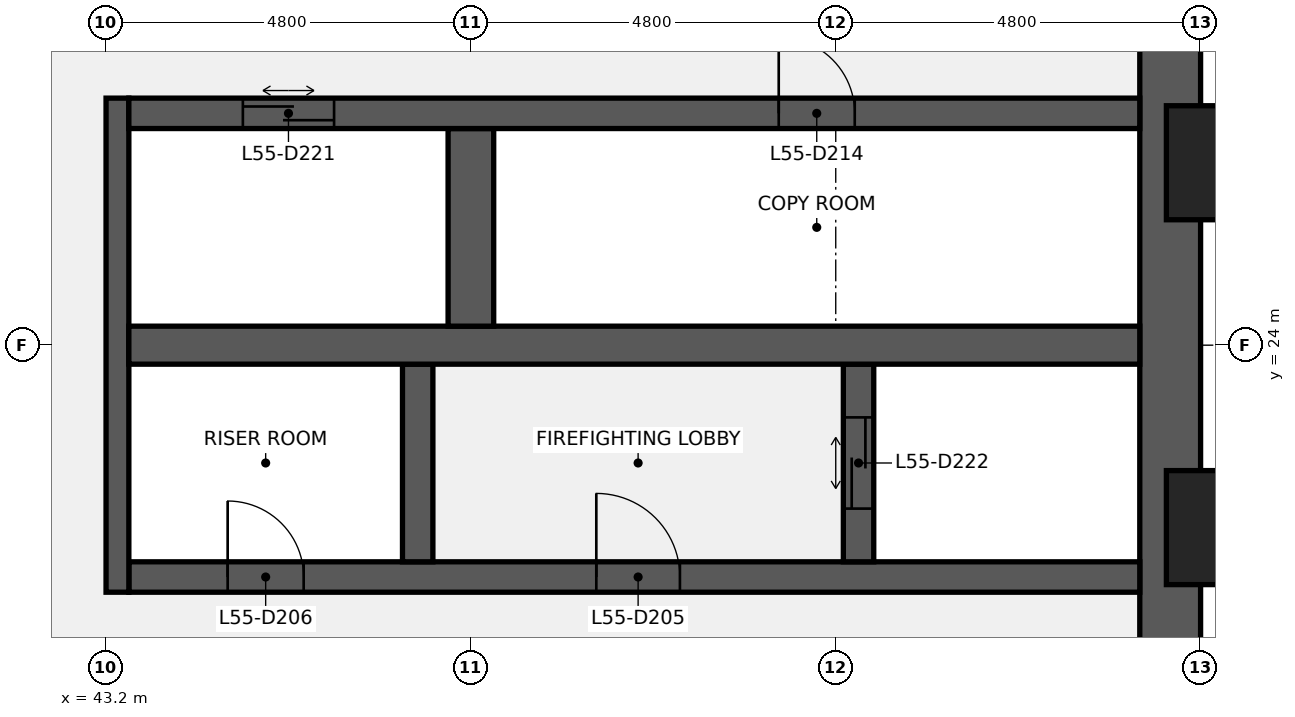
"""IFC4 building model, lengths in metres.
Left out: names, types, materials, properties, quantities, classifications, styles, units other than length and angle.
Written with IfcOpenShell. Run it as: python <this file> out.ifc"""

import sys

from ifc_helpers import new_model, si_unit, direction, frame, frame_2d, origin, origin_2d, place, context, subcontext, project, spatial, rectangle, extrude, element, fill, save


model = new_model("IFC4")
c1 = context("Model", 3, precision=1e-05, world=origin(), true_north=direction((0.0, 1.0)))
c2 = subcontext(c1, "Body", "Model", "MODEL_VIEW")
j1 = project(units=[si_unit("LENGTHUNIT", "METRE"), si_unit("PLANEANGLEUNIT", "RADIAN")], contexts=[c1])
p1 = place(None, origin())
s1 = spatial("IfcSite", under=j1, at=p1, CompositionType="ELEMENT")
p2 = place(p1, origin())
s2 = spatial("IfcBuilding", under=s1, at=p2, CompositionType="ELEMENT")
p3 = place(p2, frame((0.0, 0.0, 249.2)))
s3 = spatial("IfcBuildingStorey", under=s2, at=p3, CompositionType="ELEMENT", Elevation=249.2)
p4 = place(p3, frame((57.2, 38.4, 0.0), z_axis=(0.0, 0.0, 1.0), x_axis=(0.0, -1.0, 0.0)))
e1 = element("IfcWall", 1, at=p4, inside=s3, PredefinedType="SHEAR", context=c2, shape_type="SweptSolid", body=[
    extrude(rectangle(XDim=28.8, YDim=0.8, at=frame_2d((14.4, 0.0))), origin(), (0.0, 0.0, 1.0), 3.84),
])
p5 = place(p4, frame((18.45, 0.0, 0.9)))
e2 = element("IfcOpeningElement", 2, at=p5, cuts=e1, PredefinedType="OPENING", context=c2, shape_type="SweptSolid", body=[
    extrude(rectangle(XDim=1.5, YDim=1.5, at=frame_2d((0.75, 0.75))), frame((0.0, 0.41, 0.0), z_axis=(0.0, -1.0, 0.0), x_axis=(1.0, 0.0, 0.0)), (0.0, 0.0, 1.0), 0.82),
])
p6 = place(p4, frame((8.85, 0.0, 0.9)))
e3 = element("IfcOpeningElement", 3, at=p6, cuts=e1, PredefinedType="OPENING", context=c2, shape_type="SweptSolid", body=[
    extrude(rectangle(XDim=1.5, YDim=1.5, at=frame_2d((0.75, 0.75))), frame((0.0, 0.41, 0.0), z_axis=(0.0, -1.0, 0.0), x_axis=(1.0, 0.0, 0.0)), (0.0, 0.0, 1.0), 0.82),
])
p7 = place(p3, frame((43.5, 20.95, 0.0), z_axis=(0.0, 0.0, 1.0), x_axis=(1.0, 0.0, 0.0)))
e4 = element("IfcWall", 4, at=p7, inside=s3, PredefinedType="SHEAR", context=c2, shape_type="SweptSolid", body=[
    extrude(rectangle(XDim=13.3, YDim=0.4, at=frame_2d((6.65, 0.0))), origin(), (0.0, 0.0, 1.0), 3.84),
])
p8 = place(p7, frame((6.15, 0.0, 0.0)))
e5 = element("IfcOpeningElement", 5, at=p8, cuts=e4, PredefinedType="OPENING", context=c2, shape_type="SweptSolid", body=[
    extrude(rectangle(XDim=1.1, YDim=2.1, at=frame_2d((0.55, 1.05))), frame((0.0, 0.21, 0.0), z_axis=(0.0, -1.0, 0.0), x_axis=(1.0, 0.0, 0.0)), (0.0, 0.0, 1.0), 0.42),
])
p9 = place(p7, frame((1.3, 0.0, 0.0)))
e6 = element("IfcOpeningElement", 6, at=p9, cuts=e4, PredefinedType="OPENING", context=c2, shape_type="SweptSolid", body=[
    extrude(rectangle(XDim=1.0, YDim=2.1, at=frame_2d((0.5, 1.05))), frame((0.0, 0.21, 0.0), z_axis=(0.0, -1.0, 0.0), x_axis=(1.0, 0.0, 0.0)), (0.0, 0.0, 1.0), 0.42),
])
p10 = place(p3, frame((43.35, 20.75, 0.0), z_axis=(0.0, 0.0, 1.0), x_axis=(0.0, 1.0, 0.0)))
e7 = element("IfcWall", 7, at=p10, inside=s3, PredefinedType="SHEAR", context=c2, shape_type="SweptSolid", body=[
    extrude(rectangle(XDim=6.5, YDim=0.3, at=frame_2d((3.25, 0.0))), origin(), (0.0, 0.0, 1.0), 3.84),
])
p11 = place(p3, frame((53.1, 21.15, 0.0), z_axis=(0.0, 0.0, 1.0), x_axis=(0.0, 1.0, 0.0)))
e8 = element("IfcWall", 8, at=p11, inside=s3, PredefinedType="SHEAR", context=c2, shape_type="SweptSolid", body=[
    extrude(rectangle(XDim=2.6, YDim=0.4, at=frame_2d((1.3, 0.0))), origin(), (0.0, 0.0, 1.0), 3.84),
])
p12 = place(p11, frame((0.7, 0.0, 0.0)))
e9 = element("IfcOpeningElement", 9, at=p12, cuts=e8, PredefinedType="OPENING", context=c2, shape_type="SweptSolid", body=[
    extrude(rectangle(XDim=1.2, YDim=2.1, at=frame_2d((0.6, 1.05))), frame((0.0, 0.21, 0.0), z_axis=(0.0, -1.0, 0.0), x_axis=(1.0, 0.0, 0.0)), (0.0, 0.0, 1.0), 0.42),
])
p13 = place(p3, frame((47.3, 21.15, 0.0), z_axis=(0.0, 0.0, 1.0), x_axis=(0.0, 1.0, 0.0)))
e10 = element("IfcWall", 10, at=p13, inside=s3, PredefinedType="SHEAR", context=c2, shape_type="SweptSolid", body=[
    extrude(rectangle(XDim=2.6, YDim=0.4, at=frame_2d((1.3, 0.0))), origin(), (0.0, 0.0, 1.0), 3.84),
])
p14 = place(p3, frame((43.5, 24.0, 0.0), z_axis=(0.0, 0.0, 1.0), x_axis=(1.0, 0.0, 0.0)))
e11 = element("IfcWall", 11, at=p14, inside=s3, PredefinedType="SHEAR", context=c2, shape_type="SweptSolid", body=[
    extrude(rectangle(XDim=13.3, YDim=0.5, at=frame_2d((6.65, 0.0))), origin(), (0.0, 0.0, 1.0), 3.84),
])
p15 = place(p3, frame((48.0, 24.25, 0.0), z_axis=(0.0, 0.0, 1.0), x_axis=(0.0, 1.0, 0.0)))
e12 = element("IfcWall", 12, at=p15, inside=s3, PredefinedType="SHEAR", context=c2, shape_type="SweptSolid", body=[
    extrude(rectangle(XDim=2.6, YDim=0.6, at=frame_2d((1.3, 0.0))), origin(), (0.0, 0.0, 1.0), 3.84),
])
p16 = place(p3, frame((43.5, 27.05, 0.0), z_axis=(0.0, 0.0, 1.0), x_axis=(1.0, 0.0, 0.0)))
e13 = element("IfcWall", 13, at=p16, inside=s3, PredefinedType="SHEAR", context=c2, shape_type="SweptSolid", body=[
    extrude(rectangle(XDim=13.3, YDim=0.4, at=frame_2d((6.65, 0.0))), origin(), (0.0, 0.0, 1.0), 3.84),
])
p17 = place(p16, frame((8.55, 0.0, 0.0)))
e14 = element("IfcOpeningElement", 14, at=p17, cuts=e13, PredefinedType="OPENING", context=c2, shape_type="SweptSolid", body=[
    extrude(rectangle(XDim=1.0, YDim=2.1, at=frame_2d((0.5, 1.05))), frame((0.0, 0.21, 0.0), z_axis=(0.0, -1.0, 0.0), x_axis=(1.0, 0.0, 0.0)), (0.0, 0.0, 1.0), 0.42),
])
p18 = place(p16, frame((1.5, 0.0, 0.0)))
e15 = element("IfcOpeningElement", 15, at=p18, cuts=e13, PredefinedType="OPENING", context=c2, shape_type="SweptSolid", body=[
    extrude(rectangle(XDim=1.2, YDim=2.1, at=frame_2d((0.6, 1.05))), frame((0.0, 0.21, 0.0), z_axis=(0.0, -1.0, 0.0), x_axis=(1.0, 0.0, 0.0)), (0.0, 0.0, 1.0), 0.42),
])
for number, where, z_axis, x_axis in (
    (16, (58.35, 21.6, 0.0), (0.0, 0.0, 1.0), (0.0, 1.0, 0.0)),
    (17, (58.35, 26.4, 0.0), (0.0, 0.0, 1.0), (0.0, 1.0, 0.0)),
):
    element("IfcColumn", number, at=place(p3, frame(where, z_axis=z_axis, x_axis=x_axis)), inside=s3, PredefinedType="PILASTER", context=c2, shape_type="SweptSolid", body=[
        extrude(rectangle(XDim=2.4, YDim=1.5, at=origin_2d()), origin(), (0.0, 0.0, 1.0), 4.0),
    ])
p19 = place(p8, origin())
e18 = element("IfcDoor", 18, at=p19, inside=s3, OperationType="SINGLE_SWING_LEFT", PredefinedType="DOOR", context=c2, shape_type="SweptSolid", body=[
    extrude(rectangle(XDim=1.1, YDim=2.1, at=frame_2d((0.55, 1.05))), frame((0.0, 0.025, 0.0), z_axis=(0.0, -1.0, 0.0), x_axis=(1.0, 0.0, 0.0)), (0.0, 0.0, 1.0), 0.05),
])
fill(e5, e18)
p20 = place(p9, origin())
e19 = element("IfcDoor", 19, at=p20, inside=s3, OperationType="SINGLE_SWING_LEFT", PredefinedType="DOOR", context=c2, shape_type="SweptSolid", body=[
    extrude(rectangle(XDim=1.0, YDim=2.1, at=frame_2d((0.5, 1.05))), frame((0.0, 0.025, 0.0), z_axis=(0.0, -1.0, 0.0), x_axis=(1.0, 0.0, 0.0)), (0.0, 0.0, 1.0), 0.05),
])
fill(e6, e19)
p21 = place(p17, origin())
e20 = element("IfcDoor", 20, at=p21, inside=s3, OperationType="SINGLE_SWING_LEFT", PredefinedType="DOOR", context=c2, shape_type="SweptSolid", body=[
    extrude(rectangle(XDim=1.0, YDim=2.1, at=frame_2d((0.5, 1.05))), frame((0.0, 0.025, 0.0), z_axis=(0.0, -1.0, 0.0), x_axis=(1.0, 0.0, 0.0)), (0.0, 0.0, 1.0), 0.05),
])
fill(e14, e20)
p22 = place(p18, origin())
e21 = element("IfcDoor", 21, at=p22, inside=s3, OperationType="DOUBLE_DOOR_SLIDING", PredefinedType="DOOR", context=c2, shape_type="SweptSolid", body=[
    extrude(rectangle(XDim=1.2, YDim=2.1, at=frame_2d((0.6, 1.05))), frame((0.0, 0.025, 0.0), z_axis=(0.0, -1.0, 0.0), x_axis=(1.0, 0.0, 0.0)), (0.0, 0.0, 1.0), 0.05),
])
fill(e15, e21)
p23 = place(p12, origin())
e22 = element("IfcDoor", 22, at=p23, inside=s3, OperationType="DOUBLE_DOOR_SLIDING", PredefinedType="DOOR", context=c2, shape_type="SweptSolid", body=[
    extrude(rectangle(XDim=1.2, YDim=2.1, at=frame_2d((0.6, 1.05))), frame((0.0, 0.025, 0.0), z_axis=(0.0, -1.0, 0.0), x_axis=(1.0, 0.0, 0.0)), (0.0, 0.0, 1.0), 0.05),
])
fill(e9, e22)
save(model, sys.argv[1])
